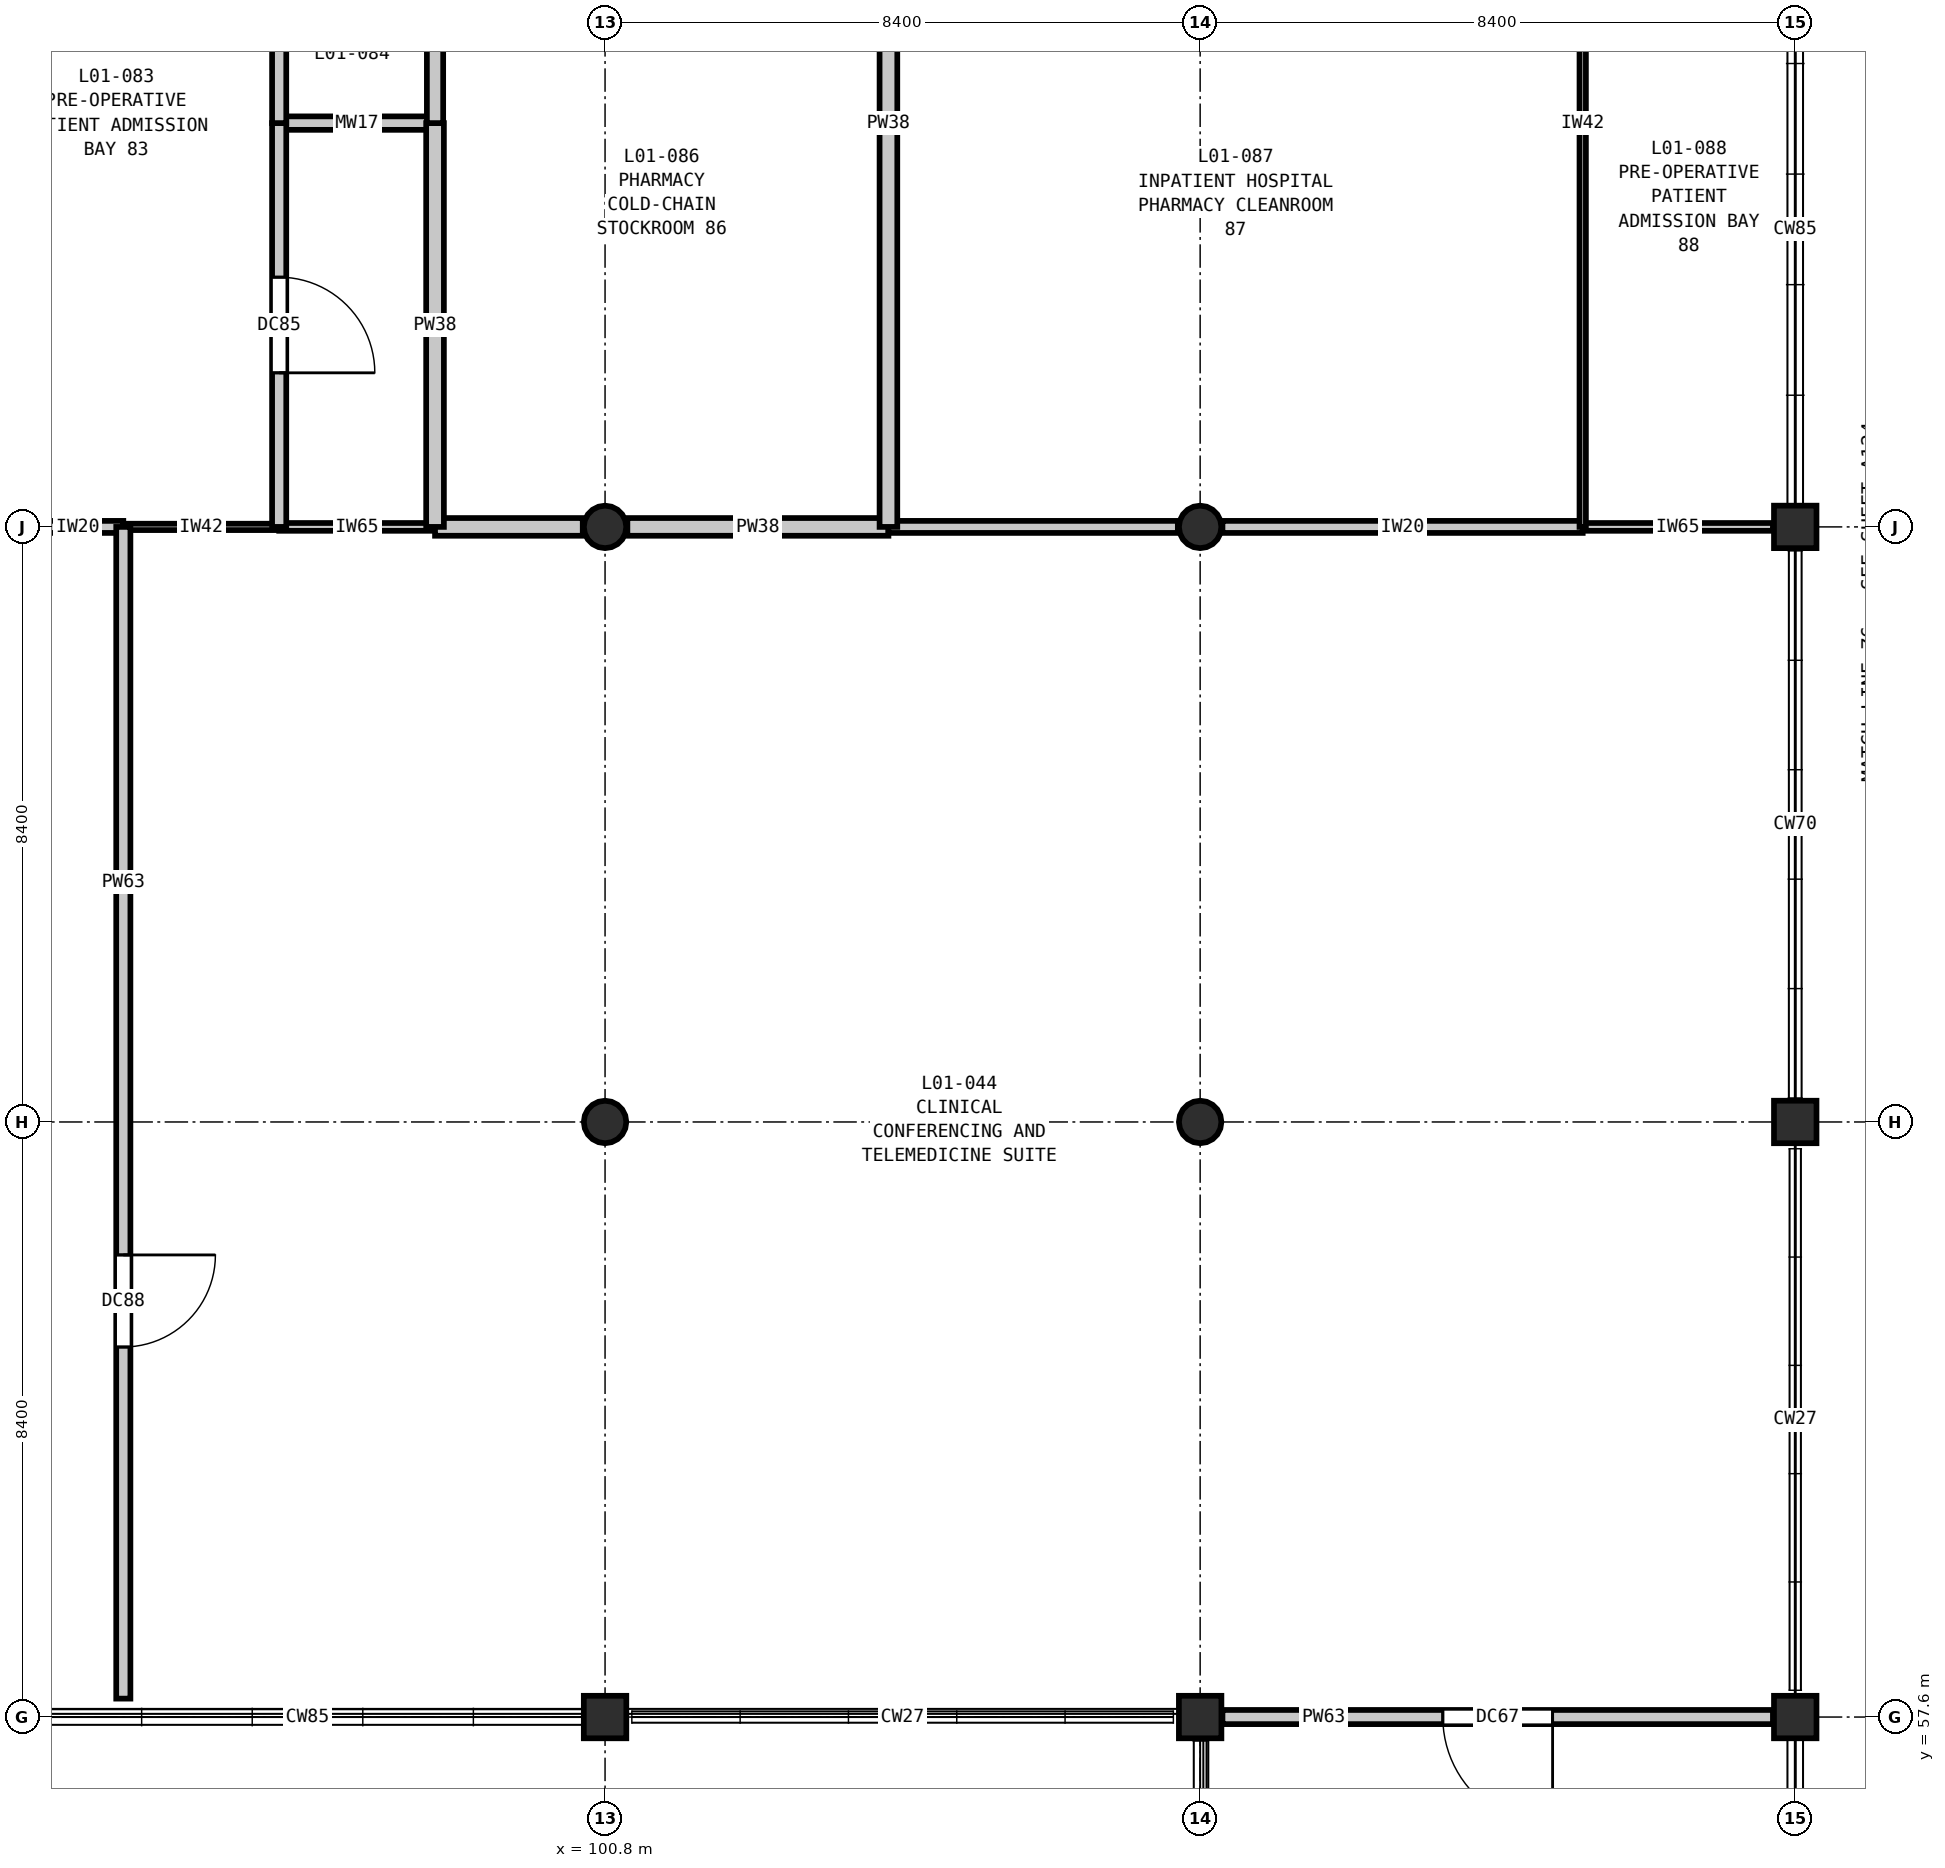
"""IFC4 building model, lengths in metres.
Left out: names, types, materials, properties, quantities, classifications, styles, units other than length and angle.
Written with IfcOpenShell. Run it as: python <this file> out.ifc"""

import sys

from ifc_helpers import new_model, si_unit, direction, frame, frame_2d, origin, origin_2d, place, context, subcontext, project, spatial, rectangle, circle, extrude, element, fill, save


model = new_model("IFC4")
c1 = context("Model", 3, precision=1e-05, world=origin(), true_north=direction((0.0, 1.0)))
c2 = subcontext(c1, "Body", "Model", "MODEL_VIEW")
j1 = project(units=[si_unit("LENGTHUNIT", "METRE"), si_unit("PLANEANGLEUNIT", "RADIAN")], contexts=[c1])
p1 = place(None, origin())
s1 = spatial("IfcSite", under=j1, at=p1, CompositionType="ELEMENT")
p2 = place(p1, origin())
s2 = spatial("IfcBuilding", under=s1, at=p2, CompositionType="ELEMENT")
p3 = place(p2, frame((0.0, 0.0, 5.4)))
s3 = spatial("IfcBuildingStorey", under=s2, at=p3, CompositionType="ELEMENT", Elevation=5.4)
p4 = place(p3, frame((100.8, 57.6, 0.0), z_axis=(0.0, 0.0, 1.0), x_axis=(1.0, 0.0, 0.0)))
e1 = element("IfcColumn", 1, at=p4, inside=s3, PredefinedType="COLUMN", context=c2, shape_type="SweptSolid", body=[
    extrude(rectangle(XDim=0.6, YDim=0.6, at=origin_2d()), origin(), (0.0, 0.0, 1.0), 5.4),
])
for number, where, z_axis, x_axis in (
    (2, (100.8, 66.0, 0.0), (0.0, 0.0, 1.0), (1.0, 0.0, 0.0)),
    (3, (100.8, 74.4, 0.0), (0.0, 0.0, 1.0), (1.0, 0.0, 0.0)),
):
    element("IfcColumn", number, at=place(p3, frame(where, z_axis=z_axis, x_axis=x_axis)), inside=s3, PredefinedType="COLUMN", context=c2, shape_type="SweptSolid", body=[
        extrude(circle(Radius=0.3, at=origin_2d()), origin(), (0.0, 0.0, 1.0), 5.4),
    ])
p5 = place(p3, frame((109.2, 57.6, 0.0), z_axis=(0.0, 0.0, 1.0), x_axis=(1.0, 0.0, 0.0)))
e4 = element("IfcColumn", 4, at=p5, inside=s3, PredefinedType="COLUMN", context=c2, shape_type="SweptSolid", body=[
    extrude(rectangle(XDim=0.6, YDim=0.6, at=origin_2d()), origin(), (0.0, 0.0, 1.0), 5.4),
])
for number, where, z_axis, x_axis in (
    (5, (109.2, 66.0, 0.0), (0.0, 0.0, 1.0), (1.0, 0.0, 0.0)),
    (6, (109.2, 74.4, 0.0), (0.0, 0.0, 1.0), (1.0, 0.0, 0.0)),
):
    element("IfcColumn", number, at=place(p3, frame(where, z_axis=z_axis, x_axis=x_axis)), inside=s3, PredefinedType="COLUMN", context=c2, shape_type="SweptSolid", body=[
        extrude(circle(Radius=0.3, at=origin_2d()), origin(), (0.0, 0.0, 1.0), 5.4),
    ])
for number, where, z_axis, x_axis in (
    (7, (117.6, 57.6, 0.0), (0.0, 0.0, 1.0), (1.0, 0.0, 0.0)),
    (8, (117.6, 66.0, 0.0), (0.0, 0.0, 1.0), (1.0, 0.0, 0.0)),
    (9, (117.6, 74.4, 0.0), (0.0, 0.0, 1.0), (1.0, 0.0, 0.0)),
):
    element("IfcColumn", number, at=place(p3, frame(where, z_axis=z_axis, x_axis=x_axis)), inside=s3, PredefinedType="COLUMN", context=c2, shape_type="SweptSolid", body=[
        extrude(rectangle(XDim=0.6, YDim=0.6, at=origin_2d()), origin(), (0.0, 0.0, 1.0), 5.4),
    ])
p6 = place(p3, frame((109.515, 57.6, 0.0), z_axis=(0.0, 0.0, 1.0), x_axis=(1.0, 0.0, 0.0)))
e10 = element("IfcWall", 10, at=p6, inside=s3, PredefinedType="PARTITIONING", context=c2, shape_type="SweptSolid", body=[
    extrude(rectangle(XDim=7.77, YDim=0.2, at=frame_2d((3.885, 0.0))), origin(), (0.0, 0.0, 1.0), 4.685),
])
p7 = place(p6, frame((3.11, 0.0, 0.0)))
e11 = element("IfcOpeningElement", 11, at=p7, cuts=e10, PredefinedType="OPENING", context=c2, shape_type="SweptSolid", body=[
    extrude(rectangle(XDim=1.55, YDim=2.25, at=frame_2d((0.775, 1.125))), frame((0.0, 0.11, 0.0), z_axis=(0.0, -1.0, 0.0), x_axis=(1.0, 0.0, 0.0)), (0.0, 0.0, 1.0), 0.22),
])
p8 = place(p3, frame((92.715, 74.4, 0.0), z_axis=(0.0, 0.0, 1.0), x_axis=(1.0, 0.0, 0.0)))
e12 = element("IfcWall", 12, at=p8, inside=s3, PredefinedType="PARTITIONING", context=c2, shape_type="SweptSolid", body=[
    extrude(rectangle(XDim=1.285, YDim=0.17, at=frame_2d((0.643, 0.0))), origin(), (0.0, 0.0, 1.0), 4.685),
])
p9 = place(p3, frame((94.0, 74.4, 0.0), z_axis=(0.0, 0.0, 1.0), x_axis=(1.0, 0.0, 0.0)))
e13 = element("IfcWall", 13, at=p9, inside=s3, PredefinedType="PARTITIONING", context=c2, shape_type="SweptSolid", body=[
    extrude(rectangle(XDim=2.2, YDim=0.09, at=frame_2d((1.1, 0.0))), origin(), (0.0, 0.0, 1.0), 4.685),
])
p10 = place(p3, frame((96.2, 74.4, 0.0), z_axis=(0.0, 0.0, 1.0), x_axis=(1.0, 0.0, 0.0)))
e14 = element("IfcWall", 14, at=p10, inside=s3, PredefinedType="PARTITIONING", context=c2, shape_type="SweptSolid", body=[
    extrude(rectangle(XDim=2.2, YDim=0.11, at=frame_2d((1.1, 0.0))), origin(), (0.0, 0.0, 1.0), 4.685),
])
p11 = place(p3, frame((101.115, 74.4, 0.0), z_axis=(0.0, 0.0, 1.0), x_axis=(1.0, 0.0, 0.0)))
e15 = element("IfcWall", 15, at=p11, inside=s3, PredefinedType="PARTITIONING", context=c2, shape_type="SweptSolid", body=[
    extrude(rectangle(XDim=3.685, YDim=0.25, at=frame_2d((1.843, 0.0))), origin(), (0.0, 0.0, 1.0), 4.685),
])
p12 = place(p3, frame((98.4, 74.4, 0.0), z_axis=(0.0, 0.0, 1.0), x_axis=(1.0, 0.0, 0.0)))
e16 = element("IfcWall", 16, at=p12, inside=s3, PredefinedType="PARTITIONING", context=c2, shape_type="SweptSolid", body=[
    extrude(rectangle(XDim=2.085, YDim=0.25, at=frame_2d((1.042, 0.0))), origin(), (0.0, 0.0, 1.0), 4.685),
])
p13 = place(p3, frame((109.515, 74.4, 0.0), z_axis=(0.0, 0.0, 1.0), x_axis=(1.0, 0.0, 0.0)))
e17 = element("IfcWall", 17, at=p13, inside=s3, PredefinedType="PARTITIONING", context=c2, shape_type="SweptSolid", body=[
    extrude(rectangle(XDim=5.085, YDim=0.17, at=frame_2d((2.542, 0.0))), origin(), (0.0, 0.0, 1.0), 4.685),
])
p14 = place(p3, frame((104.8, 74.4, 0.0), z_axis=(0.0, 0.0, 1.0), x_axis=(1.0, 0.0, 0.0)))
e18 = element("IfcWall", 18, at=p14, inside=s3, PredefinedType="PARTITIONING", context=c2, shape_type="SweptSolid", body=[
    extrude(rectangle(XDim=4.085, YDim=0.17, at=frame_2d((2.042, 0.0))), origin(), (0.0, 0.0, 1.0), 4.685),
])
p15 = place(p3, frame((114.6, 74.4, 0.0), z_axis=(0.0, 0.0, 1.0), x_axis=(1.0, 0.0, 0.0)))
e19 = element("IfcWall", 19, at=p15, inside=s3, PredefinedType="PARTITIONING", context=c2, shape_type="SweptSolid", body=[
    extrude(rectangle(XDim=2.685, YDim=0.11, at=frame_2d((1.342, 0.0))), origin(), (0.0, 0.0, 1.0), 4.685),
])
p16 = place(p3, frame((96.2, 80.1, 0.0), z_axis=(0.0, 0.0, 1.0), x_axis=(1.0, 0.0, 0.0)))
e20 = element("IfcWall", 20, at=p16, inside=s3, PredefinedType="PLUMBINGWALL", context=c2, shape_type="SweptSolid", body=[
    extrude(rectangle(XDim=2.2, YDim=0.19, at=frame_2d((1.1, 0.0))), origin(), (0.0, 0.0, 1.0), 5.05),
])
p17 = place(p3, frame((94.0, 57.86, 0.0), z_axis=(0.0, 0.0, 1.0), x_axis=(0.0, 1.0, 0.0)))
e21 = element("IfcWall", 21, at=p17, inside=s3, PredefinedType="PARTITIONING", context=c2, shape_type="SweptSolid", body=[
    extrude(rectangle(XDim=16.54, YDim=0.2, at=frame_2d((8.27, 0.0))), origin(), (0.0, 0.0, 1.0), 5.05),
])
p18 = place(p17, frame((4.963, 0.0, 0.0)))
e22 = element("IfcOpeningElement", 22, at=p18, cuts=e21, PredefinedType="OPENING", context=c2, shape_type="SweptSolid", body=[
    extrude(rectangle(XDim=1.3, YDim=2.2, at=frame_2d((0.65, 1.1))), frame((0.0, 0.11, 0.0), z_axis=(0.0, -1.0, 0.0), x_axis=(1.0, 0.0, 0.0)), (0.0, 0.0, 1.0), 0.22),
])
p19 = place(p3, frame((96.2, 74.4, 0.0), z_axis=(0.0, 0.0, 1.0), x_axis=(0.0, 1.0, 0.0)))
e23 = element("IfcWall", 23, at=p19, inside=s3, PredefinedType="PARTITIONING", context=c2, shape_type="SweptSolid", body=[
    extrude(rectangle(XDim=5.7, YDim=0.2, at=frame_2d((2.85, 0.0))), origin(), (0.0, 0.0, 1.0), 5.05),
])
p20 = place(p19, frame((2.175, 0.0, 0.0)))
e24 = element("IfcOpeningElement", 24, at=p20, cuts=e23, PredefinedType="OPENING", context=c2, shape_type="SweptSolid", body=[
    extrude(rectangle(XDim=1.35, YDim=2.2, at=frame_2d((0.675, 1.1))), frame((0.0, 0.11, 0.0), z_axis=(0.0, -1.0, 0.0), x_axis=(1.0, 0.0, 0.0)), (0.0, 0.0, 1.0), 0.22),
])
p21 = place(p3, frame((96.2, 80.1, 0.0), z_axis=(0.0, 0.0, 1.0), x_axis=(0.0, 1.0, 0.0)))
e25 = element("IfcWall", 25, at=p21, inside=s3, PredefinedType="PARTITIONING", context=c2, shape_type="SweptSolid", body=[
    extrude(rectangle(XDim=5.7, YDim=0.2, at=frame_2d((2.85, 0.0))), origin(), (0.0, 0.0, 1.0), 5.05),
])
p22 = place(p21, frame((2.39, 0.0, 0.0)))
e26 = element("IfcOpeningElement", 26, at=p22, cuts=e25, PredefinedType="OPENING", context=c2, shape_type="SweptSolid", body=[
    extrude(rectangle(XDim=0.92, YDim=2.1, at=frame_2d((0.46, 1.05))), frame((0.0, 0.11, 0.0), z_axis=(0.0, -1.0, 0.0), x_axis=(1.0, 0.0, 0.0)), (0.0, 0.0, 1.0), 0.22),
])
p23 = place(p3, frame((98.4, 74.4, 0.0), z_axis=(0.0, 0.0, 1.0), x_axis=(0.0, 1.0, 0.0)))
e27 = element("IfcWall", 27, at=p23, inside=s3, PredefinedType="PARTITIONING", context=c2, shape_type="SweptSolid", body=[
    extrude(rectangle(XDim=5.7, YDim=0.25, at=frame_2d((2.85, 0.0))), origin(), (0.0, 0.0, 1.0), 5.05),
])
p24 = place(p3, frame((98.4, 80.1, 0.0), z_axis=(0.0, 0.0, 1.0), x_axis=(0.0, 1.0, 0.0)))
e28 = element("IfcWall", 28, at=p24, inside=s3, PredefinedType="PARTITIONING", context=c2, shape_type="SweptSolid", body=[
    extrude(rectangle(XDim=5.7, YDim=0.23, at=frame_2d((2.85, 0.0))), origin(), (0.0, 0.0, 1.0), 5.05),
])
p25 = place(p3, frame((104.8, 74.4, 0.0), z_axis=(0.0, 0.0, 1.0), x_axis=(0.0, 1.0, 0.0)))
e29 = element("IfcWall", 29, at=p25, inside=s3, PredefinedType="PARTITIONING", context=c2, shape_type="SweptSolid", body=[
    extrude(rectangle(XDim=11.4, YDim=0.25, at=frame_2d((5.7, 0.0))), origin(), (0.0, 0.0, 1.0), 5.05),
])
p26 = place(p3, frame((114.6, 74.4, 0.0), z_axis=(0.0, 0.0, 1.0), x_axis=(0.0, 1.0, 0.0)))
e30 = element("IfcWall", 30, at=p26, inside=s3, PredefinedType="PARTITIONING", context=c2, shape_type="SweptSolid", body=[
    extrude(rectangle(XDim=11.4, YDim=0.09, at=frame_2d((5.7, 0.0))), origin(), (0.0, 0.0, 1.0), 5.05),
])
p27 = place(p7, frame((1.55, 0.0, 0.0), z_axis=(0.0, 0.0, 1.0), x_axis=(-1.0, 0.0, 0.0)))
e31 = element("IfcDoor", 31, at=p27, inside=s3, OperationType="SINGLE_SWING_LEFT", PredefinedType="DOOR", context=c2, shape_type="SweptSolid", body=[
    extrude(rectangle(XDim=1.55, YDim=2.25, at=frame_2d((0.775, 1.125))), frame((0.0, 0.025, 0.0), z_axis=(0.0, -1.0, 0.0), x_axis=(1.0, 0.0, 0.0)), (0.0, 0.0, 1.0), 0.05),
])
fill(e11, e31)
p28 = place(p18, frame((1.3, 0.0, 0.0), z_axis=(0.0, 0.0, 1.0), x_axis=(-1.0, 0.0, 0.0)))
e32 = element("IfcDoor", 32, at=p28, inside=s3, OperationType="SINGLE_SWING_LEFT", PredefinedType="DOOR", context=c2, shape_type="SweptSolid", body=[
    extrude(rectangle(XDim=1.3, YDim=2.2, at=frame_2d((0.65, 1.1))), frame((0.0, 0.025, 0.0), z_axis=(0.0, -1.0, 0.0), x_axis=(1.0, 0.0, 0.0)), (0.0, 0.0, 1.0), 0.05),
])
fill(e22, e32)
p29 = place(p20, frame((1.35, 0.0, 0.0), z_axis=(0.0, 0.0, 1.0), x_axis=(-1.0, 0.0, 0.0)))
e33 = element("IfcDoor", 33, at=p29, inside=s3, OperationType="SINGLE_SWING_RIGHT", PredefinedType="DOOR", context=c2, shape_type="SweptSolid", body=[
    extrude(rectangle(XDim=1.35, YDim=2.2, at=frame_2d((0.675, 1.1))), frame((0.0, 0.025, 0.0), z_axis=(0.0, -1.0, 0.0), x_axis=(1.0, 0.0, 0.0)), (0.0, 0.0, 1.0), 0.05),
])
fill(e24, e33)
save(model, sys.argv[1])
